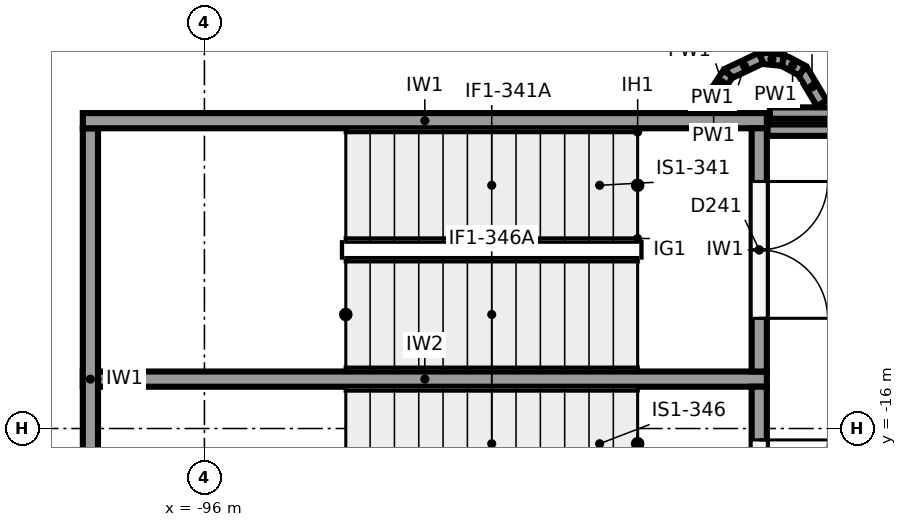
"""IFC4 building model, lengths in metres.
Left out: names, types, materials, properties, quantities, classifications, styles, units other than length and angle.
Written with IfcOpenShell. Run it as: python <this file> out.ifc"""

import sys

from ifc_helpers import new_model, si_unit, direction, frame, frame_2d, origin, place, context, subcontext, project, spatial, rectangle, extrude, element, fill, save


model = new_model("IFC4")
c1 = context("Model", 3, precision=1e-05, world=origin(), true_north=direction((0.0, 1.0)))
c2 = subcontext(c1, "Body", "Model", "MODEL_VIEW")
j1 = project(units=[si_unit("LENGTHUNIT", "METRE"), si_unit("PLANEANGLEUNIT", "RADIAN")], contexts=[c1])
p1 = place(None, origin())
s1 = spatial("IfcSite", under=j1, at=p1, CompositionType="ELEMENT")
p2 = place(p1, origin())
s2 = spatial("IfcBuilding", under=s1, at=p2, CompositionType="ELEMENT")
p3 = place(p2, frame((0.0, 0.0, -4.0)))
s3 = spatial("IfcBuildingStorey", under=s2, at=p3, CompositionType="ELEMENT", Elevation=-4.0)
p4 = place(p3, frame((-97.6, -11.95, -1.2), z_axis=(0.0, 0.0, 1.0), x_axis=(1.0, 0.0, 0.0)))
e1 = element("IfcWall", 1, at=p4, inside=s3, PredefinedType="SHEAR", context=c2, shape_type="SweptSolid", body=[
    extrude(rectangle(XDim=9.0, YDim=0.2, at=frame_2d((4.5, 0.0))), origin(), (0.0, 0.0, 1.0), 4.8),
])
p5 = place(p3, frame((-97.5, -12.05, -1.2), z_axis=(0.0, 0.0, 1.0), x_axis=(0.0, -1.0, 0.0)))
e2 = element("IfcWall", 2, at=p5, inside=s3, PredefinedType="SHEAR", context=c2, shape_type="SweptSolid", body=[
    extrude(rectangle(XDim=6.6, YDim=0.2, at=frame_2d((3.3, 0.0))), origin(), (0.0, 0.0, 1.0), 4.8),
])
p6 = place(p3, frame((-97.6, -15.35, -1.2), z_axis=(0.0, 0.0, 1.0), x_axis=(1.0, 0.0, 0.0)))
e3 = element("IfcWall", 3, at=p6, inside=s3, PredefinedType="SHEAR", context=c2, shape_type="SweptSolid", body=[
    extrude(rectangle(XDim=9.0, YDim=0.2, at=frame_2d((4.5, 0.0))), origin(), (0.0, 0.0, 1.0), 4.8),
])
p7 = place(p3, frame((-88.7, -12.05, -1.2), z_axis=(0.0, 0.0, 1.0), x_axis=(0.0, -1.0, 0.0)))
e4 = element("IfcWall", 4, at=p7, inside=s3, PredefinedType="SHEAR", context=c2, shape_type="SweptSolid", body=[
    extrude(rectangle(XDim=3.2, YDim=0.2, at=frame_2d((1.6, 0.0))), origin(), (0.0, 0.0, 1.0), 4.8),
])
p8 = place(p7, frame((0.7, 0.0, 1.2)))
e5 = element("IfcOpeningElement", 5, at=p8, cuts=e4, PredefinedType="OPENING", context=c2, shape_type="SweptSolid", body=[
    extrude(rectangle(XDim=1.8, YDim=2.1, at=frame_2d((0.9, 1.05))), frame((0.0, 0.11, 0.0), z_axis=(0.0, -1.0, 0.0), x_axis=(1.0, 0.0, 0.0)), (0.0, 0.0, 1.0), 0.22),
])
p9 = place(p3, frame((-88.7, -15.45, -1.2), z_axis=(0.0, 0.0, 1.0), x_axis=(0.0, -1.0, 0.0)))
e6 = element("IfcWall", 6, at=p9, inside=s3, PredefinedType="SHEAR", context=c2, shape_type="SweptSolid", body=[
    extrude(rectangle(XDim=3.2, YDim=0.2, at=frame_2d((1.6, 0.0))), origin(), (0.0, 0.0, 1.0), 4.8),
])
p10 = place(p9, frame((0.7, 0.0, 1.2)))
e7 = element("IfcOpeningElement", 7, at=p10, cuts=e6, PredefinedType="OPENING", context=c2, shape_type="SweptSolid", body=[
    extrude(rectangle(XDim=1.8, YDim=2.1, at=frame_2d((0.9, 1.05))), frame((0.0, 0.11, 0.0), z_axis=(0.0, -1.0, 0.0), x_axis=(1.0, 0.0, 0.0)), (0.0, 0.0, 1.0), 0.22),
])
p11 = place(p3, frame((-85.577, -11.85, 0.0), z_axis=(0.0, 0.0, 1.0), x_axis=(-1.0, 0.0, 0.0)))
e8 = element("IfcWall", 8, at=p11, inside=s3, PredefinedType="PARTITIONING", context=c2, shape_type="SweptSolid", body=[
    extrude(rectangle(XDim=2.983, YDim=0.15, at=frame_2d((1.491, 0.0))), origin(), (0.0, 0.0, 1.0), 3.6),
])
p12 = place(p3, frame((-86.125, -12.075, 0.0), z_axis=(0.0, 0.0, 1.0), x_axis=(-1.0, 0.0, 0.0)))
e9 = element("IfcWall", 9, at=p12, inside=s3, PredefinedType="PARTITIONING", context=c2, shape_type="SweptSolid", body=[
    extrude(rectangle(XDim=2.465, YDim=0.15, at=frame_2d((1.232, 0.0))), origin(), (0.0, 0.0, 1.0), 3.6),
])
p13 = place(p3, frame((-87.877, -11.721, 0.0), z_axis=(0.0, 0.0, 1.0), x_axis=(-0.513060623194, 0.858352373404, 0.0)))
e10 = element("IfcWall", 10, at=p13, inside=s3, PredefinedType="PARTITIONING", context=c2, shape_type="SweptSolid", body=[
    extrude(rectangle(XDim=0.5, YDim=0.15, at=frame_2d((0.25, 0.0))), origin(), (0.0, 0.0, 1.0), 3.6),
])
for number, where, z_axis, x_axis in (
    (11, (-88.134, -11.291, 0.0), (0.0, 0.0, 1.0), (-0.882, 0.472, 0.0)),
    (12, (-88.389, -11.155, 0.0), (0.0, 0.0, 1.0), (-0.995, 0.098, 0.0)),
):
    element("IfcWall", number, at=place(p3, frame(where, z_axis=z_axis, x_axis=x_axis)), inside=s3, PredefinedType="PARTITIONING", context=c2, shape_type="SweptSolid", body=[
        extrude(rectangle(XDim=0.289, YDim=0.15, at=frame_2d((0.145, 0.0))), origin(), (0.0, 0.0, 1.0), 3.6),
    ])
p14 = place(p3, frame((-88.677, -11.126, 0.0), z_axis=(0.0, 0.0, 1.0), x_axis=(-0.90398642908, -0.427561148889, 0.0)))
e13 = element("IfcWall", 13, at=p14, inside=s3, PredefinedType="PARTITIONING", context=c2, shape_type="SweptSolid", body=[
    extrude(rectangle(XDim=0.48, YDim=0.15, at=frame_2d((0.24, 0.0))), origin(), (0.0, 0.0, 1.0), 3.6),
])
p15 = place(p3, frame((-89.111, -11.332, 0.0), z_axis=(0.0, 0.0, 1.0), x_axis=(-0.555678694372, -0.831397130511, 0.0)))
e14 = element("IfcWall", 14, at=p15, inside=s3, PredefinedType="PARTITIONING", context=c2, shape_type="SweptSolid", body=[
    extrude(rectangle(XDim=0.288, YDim=0.15, at=frame_2d((0.144, 0.0))), origin(), (0.0, 0.0, 1.0), 3.6),
])
p16 = place(p3, frame((-89.271, -11.571, 0.0), z_axis=(0.0, 0.0, 1.0), x_axis=(-0.230253879357, -0.973130593004, 0.0)))
e15 = element("IfcWall", 15, at=p16, inside=s3, PredefinedType="PARTITIONING", context=c2, shape_type="SweptSolid", body=[
    extrude(rectangle(XDim=0.258, YDim=0.15, at=frame_2d((0.129, 0.0))), origin(), (0.0, 0.0, 1.0), 3.6),
])
p17 = place(p8, origin())
e16 = element("IfcDoor", 16, at=p17, inside=s3, OperationType="DOUBLE_DOOR_SINGLE_SWING", PredefinedType="DOOR", context=c2, shape_type="SweptSolid", body=[
    extrude(rectangle(XDim=1.8, YDim=2.1, at=frame_2d((0.9, 1.05))), frame((0.0, 0.025, 0.0), z_axis=(0.0, -1.0, 0.0), x_axis=(1.0, 0.0, 0.0)), (0.0, 0.0, 1.0), 0.05),
])
fill(e5, e16)
p18 = place(p10, origin())
e17 = element("IfcDoor", 17, at=p18, inside=s3, OperationType="DOUBLE_DOOR_SINGLE_SWING", PredefinedType="DOOR", context=c2, shape_type="SweptSolid", body=[
    extrude(rectangle(XDim=1.8, YDim=2.1, at=frame_2d((0.9, 1.05))), frame((0.0, 0.025, 0.0), z_axis=(0.0, -1.0, 0.0), x_axis=(1.0, 0.0, 0.0)), (0.0, 0.0, 1.0), 0.05),
])
fill(e7, e17)
save(model, sys.argv[1])
